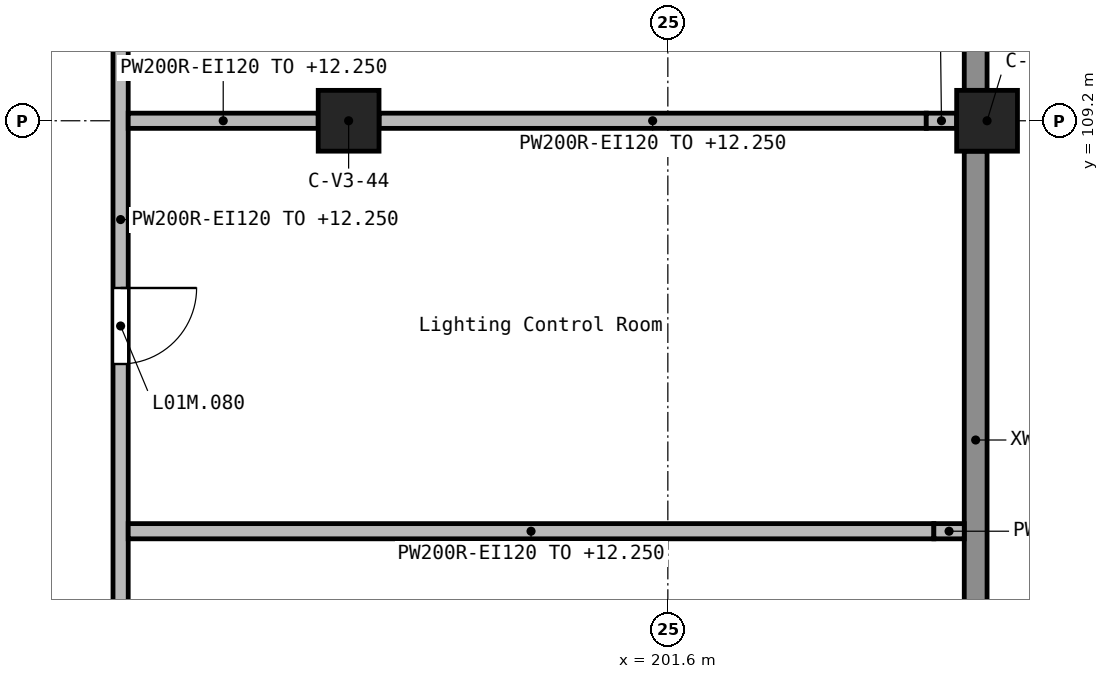
"""IFC4 building model, lengths in metres.
Left out: names, types, materials, properties, quantities, classifications, styles, units other than length and angle.
Written with IfcOpenShell. Run it as: python <this file> out.ifc"""

import sys

from ifc_helpers import new_model, si_unit, direction, frame, frame_2d, origin, origin_2d, place, context, subcontext, project, spatial, rectangle, extrude, element, fill, save


model = new_model("IFC4")
c1 = context("Model", 3, precision=1e-05, world=origin(), true_north=direction((0.0, 1.0)))
c2 = subcontext(c1, "Body", "Model", "MODEL_VIEW")
j1 = project(units=[si_unit("LENGTHUNIT", "METRE"), si_unit("PLANEANGLEUNIT", "RADIAN")], contexts=[c1])
p1 = place(None, origin())
s1 = spatial("IfcSite", under=j1, at=p1, CompositionType="ELEMENT")
p2 = place(p1, origin())
s2 = spatial("IfcBuilding", under=s1, at=p2, CompositionType="ELEMENT")
p3 = place(p2, frame((0.0, 0.0, 9.9)))
s3 = spatial("IfcBuildingStorey", under=s2, at=p3, CompositionType="ELEMENT", Elevation=9.9)
for number, where, z_axis, x_axis in (
    (1, (197.4, 109.2, 0.0), (0.0, 0.0, 1.0), (1.0, 0.0, 0.0)),
    (2, (205.8, 109.2, 0.0), (0.0, 0.0, 1.0), (1.0, 0.0, 0.0)),
):
    element("IfcColumn", number, at=place(p3, frame(where, z_axis=z_axis, x_axis=x_axis)), inside=s3, PredefinedType="COLUMN", context=c2, shape_type="SweptSolid", body=[
        extrude(rectangle(XDim=0.8, YDim=0.8, at=origin_2d()), origin(), (0.0, 0.0, 1.0), 2.7),
    ])
p4 = place(p3, frame((205.65, 101.2, 0.0), z_axis=(0.0, 0.0, 1.0), x_axis=(0.0, 1.0, 0.0)))
e3 = element("IfcWall", 3, at=p4, inside=s3, PredefinedType="STANDARD", context=c2, shape_type="SweptSolid", body=[
    extrude(rectangle(XDim=7.6, YDim=0.3, at=frame_2d((3.8, 0.0))), origin(), (0.0, 0.0, 1.0), 1.55),
])
p5 = place(p3, frame((205.65, 109.6, 0.0), z_axis=(0.0, 0.0, 1.0), x_axis=(0.0, 1.0, 0.0)))
e4 = element("IfcWall", 4, at=p5, inside=s3, PredefinedType="STANDARD", context=c2, shape_type="SweptSolid", body=[
    extrude(rectangle(XDim=7.6, YDim=0.3, at=frame_2d((3.8, 0.0))), origin(), (0.0, 0.0, 1.0), 1.55),
])
p6 = place(p3, frame((194.4, 116.9, 0.0), z_axis=(0.0, 0.0, 1.0), x_axis=(0.0, -1.0, 0.0)))
e5 = element("IfcWall", 5, at=p6, inside=s3, PredefinedType="SOLIDWALL", context=c2, shape_type="SweptSolid", body=[
    extrude(rectangle(XDim=18.0, YDim=0.2, at=frame_2d((9.0, 0.0))), origin(), (0.0, 0.0, 1.0), 2.35),
])
p7 = place(p6, frame((16.5, 0.0, 0.0)))
e6 = element("IfcOpeningElement", 6, at=p7, cuts=e5, PredefinedType="OPENING", context=c2, shape_type="SweptSolid", body=[
    extrude(rectangle(XDim=1.0, YDim=2.1, at=frame_2d((0.5, 1.05))), frame((0.0, 0.11, 0.0), z_axis=(0.0, -1.0, 0.0), x_axis=(1.0, 0.0, 0.0)), (0.0, 0.0, 1.0), 0.22),
])
p8 = place(p6, frame((14.1, 0.0, 0.0)))
e7 = element("IfcOpeningElement", 7, at=p8, cuts=e5, PredefinedType="OPENING", context=c2, shape_type="SweptSolid", body=[
    extrude(rectangle(XDim=1.0, YDim=2.1, at=frame_2d((0.5, 1.05))), frame((0.0, 0.11, 0.0), z_axis=(0.0, -1.0, 0.0), x_axis=(1.0, 0.0, 0.0)), (0.0, 0.0, 1.0), 0.22),
])
p9 = place(p6, frame((9.9, 0.0, 0.0)))
e8 = element("IfcOpeningElement", 8, at=p9, cuts=e5, PredefinedType="OPENING", context=c2, shape_type="SweptSolid", body=[
    extrude(rectangle(XDim=1.0, YDim=2.1, at=frame_2d((0.5, 1.05))), frame((0.0, 0.11, 0.0), z_axis=(0.0, -1.0, 0.0), x_axis=(1.0, 0.0, 0.0)), (0.0, 0.0, 1.0), 0.22),
])
p10 = place(p6, frame((2.6, 0.0, 0.0)))
e9 = element("IfcOpeningElement", 9, at=p10, cuts=e5, PredefinedType="OPENING", context=c2, shape_type="SweptSolid", body=[
    extrude(rectangle(XDim=1.8, YDim=2.1, at=frame_2d((0.9, 1.05))), frame((0.0, 0.11, 0.0), z_axis=(0.0, -1.0, 0.0), x_axis=(1.0, 0.0, 0.0)), (0.0, 0.0, 1.0), 0.22),
])
p11 = place(p3, frame((194.5, 103.8, 0.0), z_axis=(0.0, 0.0, 1.0), x_axis=(1.0, 0.0, 0.0)))
e10 = element("IfcWall", 10, at=p11, inside=s3, PredefinedType="SOLIDWALL", context=c2, shape_type="SweptSolid", body=[
    extrude(rectangle(XDim=10.6, YDim=0.2, at=frame_2d((5.3, 0.0))), origin(), (0.0, 0.0, 1.0), 2.35),
])
p12 = place(p3, frame((205.1, 103.8, 0.0), z_axis=(0.0, 0.0, 1.0), x_axis=(1.0, 0.0, 0.0)))
e11 = element("IfcWall", 11, at=p12, inside=s3, PredefinedType="SOLIDWALL", context=c2, shape_type="SweptSolid", body=[
    extrude(rectangle(XDim=0.4, YDim=0.2, at=frame_2d((0.2, 0.0))), origin(), (0.0, 0.0, 1.0), 1.58),
])
p13 = place(p3, frame((194.5, 109.2, 0.0), z_axis=(0.0, 0.0, 1.0), x_axis=(1.0, 0.0, 0.0)))
e12 = element("IfcWall", 12, at=p13, inside=s3, PredefinedType="SOLIDWALL", context=c2, shape_type="SweptSolid", body=[
    extrude(rectangle(XDim=2.5, YDim=0.2, at=frame_2d((1.25, 0.0))), origin(), (0.0, 0.0, 1.0), 2.35),
])
p14 = place(p3, frame((197.8, 109.2, 0.0), z_axis=(0.0, 0.0, 1.0), x_axis=(1.0, 0.0, 0.0)))
e13 = element("IfcWall", 13, at=p14, inside=s3, PredefinedType="SOLIDWALL", context=c2, shape_type="SweptSolid", body=[
    extrude(rectangle(XDim=7.2, YDim=0.2, at=frame_2d((3.6, 0.0))), origin(), (0.0, 0.0, 1.0), 2.35),
])
p15 = place(p3, frame((205.0, 109.2, 0.0), z_axis=(0.0, 0.0, 1.0), x_axis=(1.0, 0.0, 0.0)))
e14 = element("IfcWall", 14, at=p15, inside=s3, PredefinedType="SOLIDWALL", context=c2, shape_type="SweptSolid", body=[
    extrude(rectangle(XDim=0.4, YDim=0.2, at=frame_2d((0.2, 0.0))), origin(), (0.0, 0.0, 1.0), 1.58),
])
p16 = place(p9, origin())
e15 = element("IfcDoor", 15, at=p16, inside=s3, OperationType="SINGLE_SWING_RIGHT", PredefinedType="DOOR", context=c2, shape_type="SweptSolid", body=[
    extrude(rectangle(XDim=1.0, YDim=2.1, at=frame_2d((0.5, 1.05))), frame((0.0, 0.025, 0.0), z_axis=(0.0, -1.0, 0.0), x_axis=(1.0, 0.0, 0.0)), (0.0, 0.0, 1.0), 0.05),
])
fill(e8, e15)
save(model, sys.argv[1])
